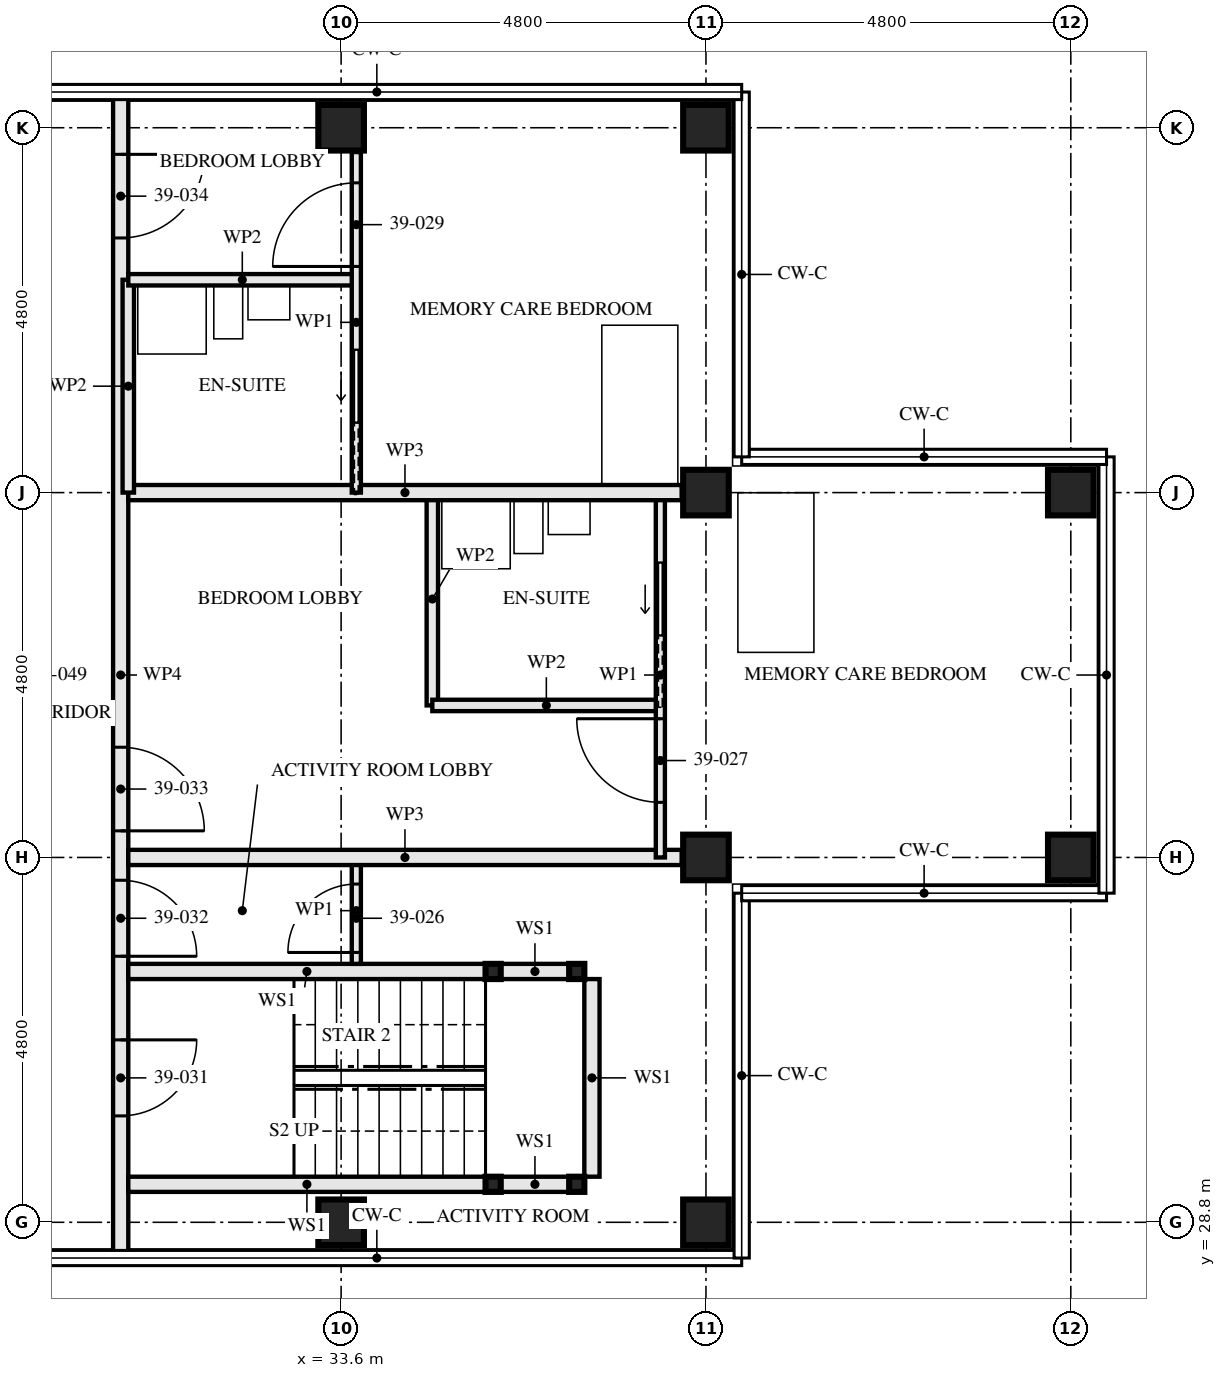
"""IFC4 building model, lengths in metres.
Left out: names, types, materials, properties, quantities, classifications, styles, units other than length and angle.
Written with IfcOpenShell. Run it as: python <this file> out.ifc"""

import sys

from ifc_helpers import new_model, si_unit, direction, frame, frame_2d, origin, origin_2d, place, context, subcontext, project, spatial, rectangle, hollow_rectangle, extrude, element, fill, save


model = new_model("IFC4")
c1 = context("Model", 3, precision=1e-05, world=origin(), true_north=direction((0.0, 1.0)))
c2 = subcontext(c1, "Body", "Model", "MODEL_VIEW")
j1 = project(units=[si_unit("LENGTHUNIT", "METRE"), si_unit("PLANEANGLEUNIT", "RADIAN")], contexts=[c1])
p1 = place(None, origin())
s1 = spatial("IfcSite", under=j1, at=p1, CompositionType="ELEMENT")
p2 = place(p1, origin())
s2 = spatial("IfcBuilding", under=s1, at=p2, CompositionType="ELEMENT")
p3 = place(p2, frame((0.0, 0.0, 144.5)))
s3 = spatial("IfcBuildingStorey", under=s2, at=p3, CompositionType="ELEMENT", Elevation=144.5)
for number, where, z_axis, x_axis in (
    (1, (33.6, 28.8, 0.0), (0.0, 0.0, 1.0), (0.0, 1.0, 0.0)),
    (2, (33.6, 43.2, 0.0), (0.0, 0.0, 1.0), (0.0, 1.0, 0.0)),
    (3, (38.4, 28.8, 0.0), (0.0, 0.0, 1.0), (0.0, 1.0, 0.0)),
    (4, (38.4, 33.6, 0.0), (0.0, 0.0, 1.0), (0.0, 1.0, 0.0)),
    (5, (38.4, 38.4, 0.0), (0.0, 0.0, 1.0), (0.0, 1.0, 0.0)),
    (6, (38.4, 43.2, 0.0), (0.0, 0.0, 1.0), (0.0, 1.0, 0.0)),
    (7, (43.2, 33.6, 0.0), (0.0, 0.0, 1.0), (0.0, 1.0, 0.0)),
    (8, (43.2, 38.4, 0.0), (0.0, 0.0, 1.0), (0.0, 1.0, 0.0)),
):
    element("IfcColumn", number, at=place(p3, frame(where, z_axis=z_axis, x_axis=x_axis)), inside=s3, PredefinedType="COLUMN", context=c2, shape_type="SweptSolid", body=[
        extrude(hollow_rectangle(XDim=0.6, YDim=0.6, WallThickness=0.08, at=origin_2d()), origin(), (0.0, 0.0, 1.0), 3.5),
    ])
for number, where, z_axis, x_axis in (
    (9, (36.7, 29.3, 0.0), (0.0, 0.0, 1.0), (1.0, 0.0, 0.0)),
    (10, (36.7, 32.1, 0.0), (0.0, 0.0, 1.0), (1.0, 0.0, 0.0)),
    (11, (35.6, 29.3, 0.0), (0.0, 0.0, 1.0), (1.0, 0.0, 0.0)),
    (12, (35.6, 32.1, 0.0), (0.0, 0.0, 1.0), (1.0, 0.0, 0.0)),
):
    element("IfcColumn", number, at=place(p3, frame(where, z_axis=z_axis, x_axis=x_axis)), inside=s3, PredefinedType="COLUMN", context=c2, shape_type="SweptSolid", body=[
        extrude(hollow_rectangle(XDim=0.2, YDim=0.2, WallThickness=0.008, at=origin_2d()), origin(), (0.0, 0.0, 1.0), 3.33),
    ])
p4 = place(p3, frame((36.6, 29.3, 0.0), z_axis=(0.0, 0.0, 1.0), x_axis=(-1.0, 0.0, 0.0)))
e13 = element("IfcWall", 13, at=p4, inside=s3, PredefinedType="SOLIDWALL", context=c2, shape_type="SweptSolid", body=[
    extrude(rectangle(XDim=0.9, YDim=0.2, at=frame_2d((0.45, 0.0))), origin(), (0.0, 0.0, 1.0), 2.99),
])
p5 = place(p3, frame((35.5, 29.3, 0.0), z_axis=(0.0, 0.0, 1.0), x_axis=(-1.0, 0.0, 0.0)))
e14 = element("IfcWall", 14, at=p5, inside=s3, PredefinedType="SOLIDWALL", context=c2, shape_type="SweptSolid", body=[
    extrude(rectangle(XDim=4.7, YDim=0.2, at=frame_2d((2.35, 0.0))), origin(), (0.0, 0.0, 1.0), 2.99),
])
p6 = place(p3, frame((36.6, 32.1, 0.0), z_axis=(0.0, 0.0, 1.0), x_axis=(-1.0, 0.0, 0.0)))
e15 = element("IfcWall", 15, at=p6, inside=s3, PredefinedType="SOLIDWALL", context=c2, shape_type="SweptSolid", body=[
    extrude(rectangle(XDim=0.9, YDim=0.2, at=frame_2d((0.45, 0.0))), origin(), (0.0, 0.0, 1.0), 2.99),
])
p7 = place(p3, frame((35.5, 32.1, 0.0), z_axis=(0.0, 0.0, 1.0), x_axis=(-1.0, 0.0, 0.0)))
e16 = element("IfcWall", 16, at=p7, inside=s3, PredefinedType="SOLIDWALL", context=c2, shape_type="SweptSolid", body=[
    extrude(rectangle(XDim=4.7, YDim=0.2, at=frame_2d((2.35, 0.0))), origin(), (0.0, 0.0, 1.0), 2.99),
])
p8 = place(p3, frame((36.9, 29.4, 0.0), z_axis=(0.0, 0.0, 1.0), x_axis=(0.0, 1.0, 0.0)))
e17 = element("IfcWall", 17, at=p8, inside=s3, PredefinedType="SOLIDWALL", context=c2, shape_type="SweptSolid", body=[
    extrude(rectangle(XDim=2.6, YDim=0.2, at=frame_2d((1.3, 0.0))), origin(), (0.0, 0.0, 1.0), 3.33),
])
p9 = place(p3, frame((33.8, 32.2, 0.0), z_axis=(0.0, 0.0, 1.0), x_axis=(0.0, 1.0, 0.0)))
e18 = element("IfcWall", 18, at=p9, inside=s3, PredefinedType="PARTITIONING", context=c2, shape_type="SweptSolid", body=[
    extrude(rectangle(XDim=1.4, YDim=0.12, at=frame_2d((0.7, 0.0))), origin(), (0.0, 0.0, 1.0), 3.33),
])
p10 = place(p9, frame((0.15, 0.0, 0.0)))
e19 = element("IfcOpeningElement", 19, at=p10, cuts=e18, PredefinedType="OPENING", context=c2, shape_type="SweptSolid", body=[
    extrude(rectangle(XDim=0.9, YDim=2.1, at=frame_2d((0.45, 1.05))), frame((0.0, 0.071, 0.0), z_axis=(0.0, -1.0, 0.0), x_axis=(1.0, 0.0, 0.0)), (0.0, 0.0, 1.0), 0.141),
])
p11 = place(p3, frame((38.08, 33.6, 0.0), z_axis=(0.0, 0.0, 1.0), x_axis=(-1.0, 0.0, 0.0)))
e20 = element("IfcWall", 20, at=p11, inside=s3, PredefinedType="PARTITIONING", context=c2, shape_type="SweptSolid", body=[
    extrude(rectangle(XDim=7.28, YDim=0.2, at=frame_2d((3.64, 0.0))), origin(), (0.0, 0.0, 1.0), 2.55),
])
p12 = place(p3, frame((37.8, 35.6, 0.0), z_axis=(0.0, 0.0, 1.0), x_axis=(-1.0, 0.0, 0.0)))
e21 = element("IfcWall", 21, at=p12, inside=s3, PredefinedType="PARTITIONING", context=c2, shape_type="SweptSolid", body=[
    extrude(rectangle(XDim=3.0, YDim=0.15, at=frame_2d((1.5, 0.0))), origin(), (0.0, 0.0, 1.0), 3.33),
])
p13 = place(p3, frame((34.8, 35.6, 0.0), z_axis=(0.0, 0.0, 1.0), x_axis=(0.0, 1.0, 0.0)))
e22 = element("IfcWall", 22, at=p13, inside=s3, PredefinedType="PARTITIONING", context=c2, shape_type="SweptSolid", body=[
    extrude(rectangle(XDim=2.8, YDim=0.15, at=frame_2d((1.4, 0.0))), origin(), (0.0, 0.0, 1.0), 3.33),
])
p14 = place(p3, frame((37.8, 33.6, 0.0), z_axis=(0.0, 0.0, 1.0), x_axis=(0.0, 1.0, 0.0)))
e23 = element("IfcWall", 23, at=p14, inside=s3, PredefinedType="PARTITIONING", context=c2, shape_type="SweptSolid", body=[
    extrude(rectangle(XDim=4.8, YDim=0.12, at=frame_2d((2.4, 0.0))), origin(), (0.0, 0.0, 1.0), 3.33),
])
p15 = place(p14, frame((0.725, 0.0, 0.0)))
e24 = element("IfcOpeningElement", 24, at=p15, cuts=e23, PredefinedType="OPENING", context=c2, shape_type="SweptSolid", body=[
    extrude(rectangle(XDim=1.1, YDim=2.1, at=frame_2d((0.55, 1.05))), frame((0.0, 0.071, 0.0), z_axis=(0.0, -1.0, 0.0), x_axis=(1.0, 0.0, 0.0)), (0.0, 0.0, 1.0), 0.141),
])
p16 = place(p14, frame((2.925, 0.0, 0.0)))
e25 = element("IfcOpeningElement", 25, at=p16, cuts=e23, PredefinedType="OPENING", context=c2, shape_type="SweptSolid", body=[
    extrude(rectangle(XDim=0.95, YDim=2.1, at=frame_2d((0.475, 1.05))), frame((0.0, 0.071, 0.0), z_axis=(0.0, -1.0, 0.0), x_axis=(1.0, 0.0, 0.0)), (0.0, 0.0, 1.0), 0.141),
])
p17 = place(p3, frame((38.08, 38.4, 0.0), z_axis=(0.0, 0.0, 1.0), x_axis=(-1.0, 0.0, 0.0)))
e26 = element("IfcWall", 26, at=p17, inside=s3, PredefinedType="PARTITIONING", context=c2, shape_type="SweptSolid", body=[
    extrude(rectangle(XDim=7.28, YDim=0.2, at=frame_2d((3.64, 0.0))), origin(), (0.0, 0.0, 1.0), 2.55),
])
p18 = place(p3, frame((33.8, 41.2, 0.0), z_axis=(0.0, 0.0, 1.0), x_axis=(-1.0, 0.0, 0.0)))
e27 = element("IfcWall", 27, at=p18, inside=s3, PredefinedType="PARTITIONING", context=c2, shape_type="SweptSolid", body=[
    extrude(rectangle(XDim=3.0, YDim=0.15, at=frame_2d((1.5, 0.0))), origin(), (0.0, 0.0, 1.0), 3.33),
])
p19 = place(p3, frame((30.8, 38.4, 0.0), z_axis=(0.0, 0.0, 1.0), x_axis=(0.0, 1.0, 0.0)))
e28 = element("IfcWall", 28, at=p19, inside=s3, PredefinedType="PARTITIONING", context=c2, shape_type="SweptSolid", body=[
    extrude(rectangle(XDim=2.8, YDim=0.15, at=frame_2d((1.4, 0.0))), origin(), (0.0, 0.0, 1.0), 3.33),
])
p20 = place(p3, frame((33.8, 38.4, 0.0), z_axis=(0.0, 0.0, 1.0), x_axis=(0.0, 1.0, 0.0)))
e29 = element("IfcWall", 29, at=p20, inside=s3, PredefinedType="PARTITIONING", context=c2, shape_type="SweptSolid", body=[
    extrude(rectangle(XDim=4.48, YDim=0.12, at=frame_2d((2.24, 0.0))), origin(), (0.0, 0.0, 1.0), 3.33),
])
p21 = place(p20, frame((2.975, 0.0, 0.0)))
e30 = element("IfcOpeningElement", 30, at=p21, cuts=e29, PredefinedType="OPENING", context=c2, shape_type="SweptSolid", body=[
    extrude(rectangle(XDim=1.1, YDim=2.1, at=frame_2d((0.55, 1.05))), frame((0.0, 0.071, 0.0), z_axis=(0.0, -1.0, 0.0), x_axis=(1.0, 0.0, 0.0)), (0.0, 0.0, 1.0), 0.141),
])
p22 = place(p20, frame((0.925, 0.0, 0.0)))
e31 = element("IfcOpeningElement", 31, at=p22, cuts=e29, PredefinedType="OPENING", context=c2, shape_type="SweptSolid", body=[
    extrude(rectangle(XDim=0.95, YDim=2.1, at=frame_2d((0.475, 1.05))), frame((0.0, 0.071, 0.0), z_axis=(0.0, -1.0, 0.0), x_axis=(1.0, 0.0, 0.0)), (0.0, 0.0, 1.0), 0.141),
])
p23 = place(p3, frame((30.7, 28.35, 0.0), z_axis=(0.0, 0.0, 1.0), x_axis=(0.0, 1.0, 0.0)))
e32 = element("IfcWall", 32, at=p23, inside=s3, PredefinedType="PARTITIONING", context=c2, shape_type="SweptSolid", body=[
    extrude(rectangle(XDim=15.3, YDim=0.2, at=frame_2d((7.65, 0.0))), origin(), (0.0, 0.0, 1.0), 2.32),
])
p24 = place(p23, frame((1.85, 0.0, 0.0)))
e33 = element("IfcOpeningElement", 33, at=p24, cuts=e32, PredefinedType="OPENING", context=c2, shape_type="SweptSolid", body=[
    extrude(rectangle(XDim=1.0, YDim=2.1, at=frame_2d((0.5, 1.05))), frame((0.0, 0.111, 0.0), z_axis=(0.0, -1.0, 0.0), x_axis=(1.0, 0.0, 0.0)), (0.0, 0.0, 1.0), 0.221),
])
p25 = place(p23, frame((3.95, 0.0, 0.0)))
e34 = element("IfcOpeningElement", 34, at=p25, cuts=e32, PredefinedType="OPENING", context=c2, shape_type="SweptSolid", body=[
    extrude(rectangle(XDim=1.0, YDim=2.1, at=frame_2d((0.5, 1.05))), frame((0.0, 0.111, 0.0), z_axis=(0.0, -1.0, 0.0), x_axis=(1.0, 0.0, 0.0)), (0.0, 0.0, 1.0), 0.221),
])
p26 = place(p23, frame((5.6, 0.0, 0.0)))
e35 = element("IfcOpeningElement", 35, at=p26, cuts=e32, PredefinedType="OPENING", context=c2, shape_type="SweptSolid", body=[
    extrude(rectangle(XDim=1.1, YDim=2.1, at=frame_2d((0.55, 1.05))), frame((0.0, 0.111, 0.0), z_axis=(0.0, -1.0, 0.0), x_axis=(1.0, 0.0, 0.0)), (0.0, 0.0, 1.0), 0.221),
])
p27 = place(p23, frame((13.4, 0.0, 0.0)))
e36 = element("IfcOpeningElement", 36, at=p27, cuts=e32, PredefinedType="OPENING", context=c2, shape_type="SweptSolid", body=[
    extrude(rectangle(XDim=1.1, YDim=2.1, at=frame_2d((0.55, 1.05))), frame((0.0, 0.111, 0.0), z_axis=(0.0, -1.0, 0.0), x_axis=(1.0, 0.0, 0.0)), (0.0, 0.0, 1.0), 0.221),
])
p28 = place(p10, origin())
e37 = element("IfcDoor", 37, at=p28, inside=s3, OperationType="SINGLE_SWING_RIGHT", PredefinedType="DOOR", context=c2, shape_type="SweptSolid", body=[
    extrude(rectangle(XDim=0.9, YDim=2.1, at=frame_2d((0.45, 1.05))), frame((0.0, 0.022, 0.0), z_axis=(0.0, -1.0, 0.0), x_axis=(1.0, 0.0, 0.0)), (0.0, 0.0, 1.0), 0.044),
])
fill(e19, e37)
p29 = place(p15, origin())
e38 = element("IfcDoor", 38, at=p29, inside=s3, OperationType="SINGLE_SWING_LEFT", PredefinedType="DOOR", context=c2, shape_type="SweptSolid", body=[
    extrude(rectangle(XDim=1.1, YDim=2.1, at=frame_2d((0.55, 1.05))), frame((0.0, 0.022, 0.0), z_axis=(0.0, -1.0, 0.0), x_axis=(1.0, 0.0, 0.0)), (0.0, 0.0, 1.0), 0.044),
])
fill(e24, e38)
p30 = place(p16, origin())
e39 = element("IfcDoor", 39, at=p30, inside=s3, OperationType="SLIDING_TO_RIGHT", PredefinedType="DOOR", context=c2, shape_type="SweptSolid", body=[
    extrude(rectangle(XDim=0.95, YDim=2.1, at=frame_2d((0.475, 1.05))), frame((0.0, 0.022, 0.0), z_axis=(0.0, -1.0, 0.0), x_axis=(1.0, 0.0, 0.0)), (0.0, 0.0, 1.0), 0.044),
])
fill(e25, e39)
p31 = place(p21, origin())
e40 = element("IfcDoor", 40, at=p31, inside=s3, OperationType="SINGLE_SWING_RIGHT", PredefinedType="DOOR", context=c2, shape_type="SweptSolid", body=[
    extrude(rectangle(XDim=1.1, YDim=2.1, at=frame_2d((0.55, 1.05))), frame((0.0, 0.022, 0.0), z_axis=(0.0, -1.0, 0.0), x_axis=(1.0, 0.0, 0.0)), (0.0, 0.0, 1.0), 0.044),
])
fill(e30, e40)
p32 = place(p22, origin())
e41 = element("IfcDoor", 41, at=p32, inside=s3, OperationType="SLIDING_TO_RIGHT", PredefinedType="DOOR", context=c2, shape_type="SweptSolid", body=[
    extrude(rectangle(XDim=0.95, YDim=2.1, at=frame_2d((0.475, 1.05))), frame((0.0, 0.022, 0.0), z_axis=(0.0, -1.0, 0.0), x_axis=(1.0, 0.0, 0.0)), (0.0, 0.0, 1.0), 0.044),
])
fill(e31, e41)
p33 = place(p24, frame((1.0, 0.0, 0.0), z_axis=(0.0, 0.0, 1.0), x_axis=(-1.0, 0.0, 0.0)))
e42 = element("IfcDoor", 42, at=p33, inside=s3, OperationType="SINGLE_SWING_RIGHT", PredefinedType="DOOR", context=c2, shape_type="SweptSolid", body=[
    extrude(rectangle(XDim=1.0, YDim=2.1, at=frame_2d((0.5, 1.05))), frame((0.0, 0.032, 0.0), z_axis=(0.0, -1.0, 0.0), x_axis=(1.0, 0.0, 0.0)), (0.0, 0.0, 1.0), 0.064),
])
fill(e33, e42)
p34 = place(p25, frame((1.0, 0.0, 0.0), z_axis=(0.0, 0.0, 1.0), x_axis=(-1.0, 0.0, 0.0)))
e43 = element("IfcDoor", 43, at=p34, inside=s3, OperationType="SINGLE_SWING_LEFT", PredefinedType="DOOR", context=c2, shape_type="SweptSolid", body=[
    extrude(rectangle(XDim=1.0, YDim=2.1, at=frame_2d((0.5, 1.05))), frame((0.0, 0.027, 0.0), z_axis=(0.0, -1.0, 0.0), x_axis=(1.0, 0.0, 0.0)), (0.0, 0.0, 1.0), 0.054),
])
fill(e34, e43)
p35 = place(p26, frame((1.1, 0.0, 0.0), z_axis=(0.0, 0.0, 1.0), x_axis=(-1.0, 0.0, 0.0)))
e44 = element("IfcDoor", 44, at=p35, inside=s3, OperationType="SINGLE_SWING_LEFT", PredefinedType="DOOR", context=c2, shape_type="SweptSolid", body=[
    extrude(rectangle(XDim=1.1, YDim=2.1, at=frame_2d((0.55, 1.05))), frame((0.0, 0.027, 0.0), z_axis=(0.0, -1.0, 0.0), x_axis=(1.0, 0.0, 0.0)), (0.0, 0.0, 1.0), 0.054),
])
fill(e35, e44)
p36 = place(p27, frame((1.1, 0.0, 0.0), z_axis=(0.0, 0.0, 1.0), x_axis=(-1.0, 0.0, 0.0)))
e45 = element("IfcDoor", 45, at=p36, inside=s3, OperationType="SINGLE_SWING_RIGHT", PredefinedType="DOOR", context=c2, shape_type="SweptSolid", body=[
    extrude(rectangle(XDim=1.1, YDim=2.1, at=frame_2d((0.55, 1.05))), frame((0.0, 0.027, 0.0), z_axis=(0.0, -1.0, 0.0), x_axis=(1.0, 0.0, 0.0)), (0.0, 0.0, 1.0), 0.054),
])
fill(e36, e45)
save(model, sys.argv[1])
